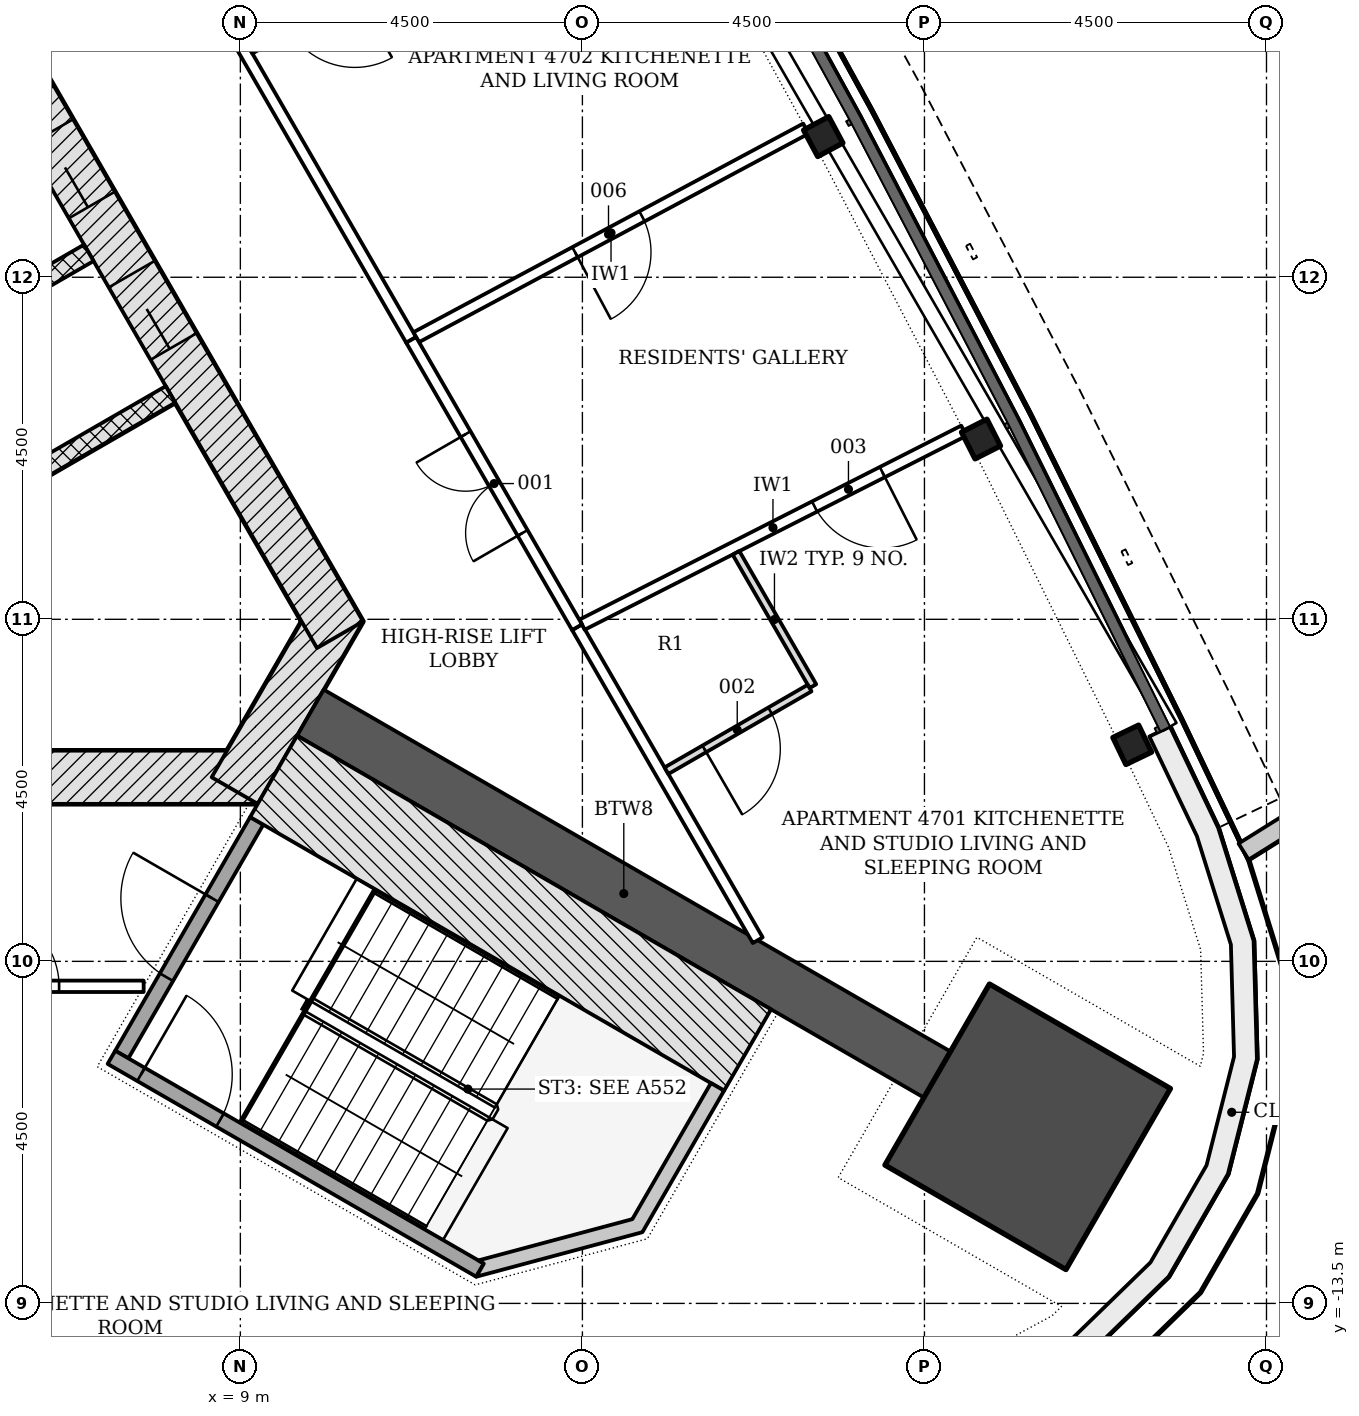
"""IFC4 building model, lengths in metres.
Left out: names, types, materials, properties, quantities, classifications, styles, units other than length and angle.
Written with IfcOpenShell. Run it as: python <this file> out.ifc"""

import sys

from ifc_helpers import new_model, si_unit, direction, frame, frame_2d, origin, origin_2d, place, context, subcontext, project, spatial, polyline, rectangle, i_section, outline, extrude, element, fill, save


model = new_model("IFC4")
c1 = context("Model", 3, precision=1e-05, world=origin(), true_north=direction((0.0, 1.0)))
c2 = subcontext(c1, "Body", "Model", "MODEL_VIEW")
j1 = project(units=[si_unit("LENGTHUNIT", "METRE"), si_unit("PLANEANGLEUNIT", "RADIAN")], contexts=[c1])
p1 = place(None, origin())
s1 = spatial("IfcSite", under=j1, at=p1, CompositionType="ELEMENT")
p2 = place(p1, origin())
s2 = spatial("IfcBuilding", under=s1, at=p2, CompositionType="ELEMENT")
p3 = place(p2, frame((0.0, 0.0, 185.1)))
s3 = spatial("IfcBuildingStorey", under=s2, at=p3, CompositionType="ELEMENT", Elevation=185.1)
p4 = place(p3, frame((-9.229, -6.578, -0.2), z_axis=(0.0, 0.0, 1.0), x_axis=(1.0, 0.0, 0.0)))
e1 = element("IfcWall", 1, at=p4, inside=s3, PredefinedType="SHEAR", context=c2, shape_type="SweptSolid", body=[
    extrude(rectangle(XDim=18.458, YDim=0.7, at=frame_2d((9.229, 0.0))), origin(), (0.0, 0.0, 1.0), 3.6),
])
p5 = place(p4, frame((9.5, 0.0, 0.2)))
e2 = element("IfcOpeningElement", 2, at=p5, cuts=e1, PredefinedType="OPENING", context=c2, shape_type="SweptSolid", body=[
    extrude(rectangle(XDim=1.0, YDim=2.1, at=frame_2d((0.5, 1.05))), frame((0.0, 0.36, 0.0), z_axis=(0.0, -1.0, 0.0), x_axis=(1.0, 0.0, 0.0)), (0.0, 0.0, 1.0), 0.72),
])
p6 = place(p4, frame((4.402, 0.0, 0.2)))
e3 = element("IfcOpeningElement", 3, at=p6, cuts=e1, PredefinedType="OPENING", context=c2, shape_type="SweptSolid", body=[
    extrude(rectangle(XDim=0.9, YDim=2.1, at=frame_2d((0.45, 1.05))), frame((0.0, 0.36, 0.0), z_axis=(0.0, -1.0, 0.0), x_axis=(1.0, 0.0, 0.0)), (0.0, 0.0, 1.0), 0.72),
])
p7 = place(p4, frame((13.927, 0.0, 0.2)))
e4 = element("IfcOpeningElement", 4, at=p7, cuts=e1, PredefinedType="OPENING", context=c2, shape_type="SweptSolid", body=[
    extrude(rectangle(XDim=0.9, YDim=2.1, at=frame_2d((0.45, 1.05))), frame((0.0, 0.36, 0.0), z_axis=(0.0, -1.0, 0.0), x_axis=(1.0, 0.0, 0.0)), (0.0, 0.0, 1.0), 0.72),
])
p8 = place(p3, frame((8.926, -6.753, -0.2), z_axis=(0.0, 0.0, 1.0), x_axis=(0.500042739161, 0.866000726912, 0.0)))
e5 = element("IfcWall", 5, at=p8, inside=s3, PredefinedType="SHEAR", context=c2, shape_type="SweptSolid", body=[
    extrude(rectangle(XDim=2.771, YDim=0.7, at=frame_2d((1.386, 0.0))), origin(), (0.0, 0.0, 1.0), 3.6),
])
p9 = place(p3, frame((10.311, -4.703, -0.2), z_axis=(0.0, 0.0, 1.0), x_axis=(-0.500001446645, 0.866024568562, 0.0)))
e6 = element("IfcWall", 6, at=p9, inside=s3, PredefinedType="SHEAR", context=c2, shape_type="SweptSolid", body=[
    extrude(rectangle(XDim=18.458, YDim=0.7, at=frame_2d((9.229, 0.0))), origin(), (0.0, 0.0, 1.0), 3.6),
])
p10 = place(p9, frame((4.379, 0.0, 0.2)))
e7 = element("IfcOpeningElement", 7, at=p10, cuts=e6, PredefinedType="OPENING", context=c2, shape_type="SweptSolid", body=[
    extrude(rectangle(XDim=1.1, YDim=2.1, at=frame_2d((0.55, 1.05))), frame((0.0, 0.36, 0.0), z_axis=(0.0, -1.0, 0.0), x_axis=(1.0, 0.0, 0.0)), (0.0, 0.0, 1.0), 0.72),
])
p11 = place(p9, frame((6.529, 0.0, 0.2)))
e8 = element("IfcOpeningElement", 8, at=p11, cuts=e6, PredefinedType="OPENING", context=c2, shape_type="SweptSolid", body=[
    extrude(rectangle(XDim=1.1, YDim=2.1, at=frame_2d((0.55, 1.05))), frame((0.0, 0.36, 0.0), z_axis=(0.0, -1.0, 0.0), x_axis=(1.0, 0.0, 0.0)), (0.0, 0.0, 1.0), 0.72),
])
p12 = place(p9, frame((8.679, 0.0, 0.2)))
e9 = element("IfcOpeningElement", 9, at=p12, cuts=e6, PredefinedType="OPENING", context=c2, shape_type="SweptSolid", body=[
    extrude(rectangle(XDim=1.1, YDim=2.1, at=frame_2d((0.55, 1.05))), frame((0.0, 0.36, 0.0), z_axis=(0.0, -1.0, 0.0), x_axis=(1.0, 0.0, 0.0)), (0.0, 0.0, 1.0), 0.72),
])
p13 = place(p9, frame((10.829, 0.0, 0.2)))
e10 = element("IfcOpeningElement", 10, at=p13, cuts=e6, PredefinedType="OPENING", context=c2, shape_type="SweptSolid", body=[
    extrude(rectangle(XDim=1.1, YDim=2.1, at=frame_2d((0.55, 1.05))), frame((0.0, 0.36, 0.0), z_axis=(0.0, -1.0, 0.0), x_axis=(1.0, 0.0, 0.0)), (0.0, 0.0, 1.0), 0.72),
])
p14 = place(p9, frame((12.979, 0.0, 0.2)))
e11 = element("IfcOpeningElement", 11, at=p14, cuts=e6, PredefinedType="OPENING", context=c2, shape_type="SweptSolid", body=[
    extrude(rectangle(XDim=1.1, YDim=2.1, at=frame_2d((0.55, 1.05))), frame((0.0, 0.36, 0.0), z_axis=(0.0, -1.0, 0.0), x_axis=(1.0, 0.0, 0.0)), (0.0, 0.0, 1.0), 0.72),
])
p15 = place(p3, frame((9.922, -5.728, -0.2), z_axis=(0.0, 0.0, 1.0), x_axis=(0.866025463095, -0.499999897272, 0.0)))
e12 = element("IfcWall", 12, at=p15, inside=s3, PredefinedType="SHEAR", context=c2, shape_type="SweptSolid", body=[
    extrude(rectangle(XDim=9.521, YDim=0.7, at=frame_2d((4.761, 0.0))), origin(), (0.0, 0.0, 1.0), 3.6),
])
p16 = place(p3, frame((19.358, -11.177, -0.2), z_axis=(0.0, 0.0, 1.0), x_axis=(0.866025403784, -0.5, 0.0)))
e13 = element("IfcColumn", 13, at=p16, inside=s3, PredefinedType="COLUMN", context=c2, shape_type="SweptSolid", body=[
    extrude(rectangle(XDim=2.75, YDim=2.75, at=origin_2d()), origin(), (0.0, 0.0, 1.0), 3.6),
])
for number, where, z_axis, x_axis in (
    (14, (20.734, -6.151, -0.2), (0.0, 0.0, 1.0), (-0.434, 0.901, 0.0)),
    (15, (18.744, -2.128, -0.2), (0.0, 0.0, 1.0), (-0.453, 0.892, 0.0)),
    (16, (16.668, 1.851, -0.2), (0.0, 0.0, 1.0), (-0.472, 0.882, 0.0)),
):
    element("IfcColumn", number, at=place(p3, frame(where, z_axis=z_axis, x_axis=x_axis)), inside=s3, PredefinedType="COLUMN", context=c2, shape_type="SweptSolid", body=[
        extrude(i_section(OverallWidth=0.394, OverallDepth=0.376, WebThickness=0.017, FlangeThickness=0.028, FilletRadius=0.015, at=origin_2d()), origin(), (0.0, 0.0, 1.0), 3.6),
    ])
p17 = place(p3, origin())
e17 = element("IfcWall", 17, at=p17, inside=s3, PredefinedType="NOTDEFINED", context=c2, shape_type="SweptSolid", body=[
    extrude(outline(polyline([(15.735, -15.429), (17.205, -15.313), (18.726, -14.974), (20.096, -14.233), (21.213, -13.147), (21.992, -11.798), (22.374, -10.287), (22.33, -8.73), (21.865, -7.243), (21.229, -5.913), (20.959, -6.042), (21.584, -7.353), (22.032, -8.78), (22.073, -10.254), (21.711, -11.684), (20.974, -12.961), (19.917, -13.989), (18.619, -14.69), (17.16, -15.016), (15.712, -15.13), (15.735, -15.429)])), origin(), (0.0, 0.0, 1.0), 3.3),
])
p18 = place(p3, origin())
e18 = element("IfcWall", 18, at=p18, inside=s3, PredefinedType="PARAPET", context=c2, shape_type="SweptSolid", body=[
    extrude(outline(polyline([(22.265, -7.662), (24.846, -6.048), (27.171, -4.156), (29.169, -2.042), (30.78, 0.228), (31.954, 2.586), (32.656, 4.96), (32.864, 7.277), (32.572, 9.469), (31.789, 11.467), (30.539, 13.211), (28.86, 14.648), (26.802, 15.735), (24.429, 16.438), (21.812, 16.737), (19.031, 16.622), (16.171, 16.096), (13.317, 15.176), (10.558, 13.889), (10.664, 13.662), (13.409, 14.942), (16.232, 15.853), (19.059, 16.373), (21.803, 16.487), (24.379, 16.193), (26.708, 15.502), (28.719, 14.44), (30.354, 13.041), (31.568, 11.346), (32.328, 9.406), (32.612, 7.272), (32.409, 5.007), (31.72, 2.678), (30.565, 0.357), (28.976, -1.883), (27.001, -3.972), (24.7, -5.844), (22.132, -7.45), (22.265, -7.662)])), origin(), (0.0, 0.0, 1.0), 1.1),
])
for number, where, z_axis, x_axis in (
    (19, (8.081, -1.541, -0.2), (0.0, 0.0, 1.0), (-0.866, -0.5, 0.0)),
    (20, (7.006, 0.321, -0.2), (0.0, 0.0, 1.0), (-0.866, -0.5, 0.0)),
):
    element("IfcWall", number, at=place(p3, frame(where, z_axis=z_axis, x_axis=x_axis)), inside=s3, PredefinedType="PARTITIONING", context=c2, shape_type="SweptSolid", body=[
        extrude(rectangle(XDim=2.5, YDim=0.25, at=frame_2d((1.25, 0.0))), origin(), (0.0, 0.0, 1.0), 3.6),
    ])
p19 = place(p3, frame((7.44, -10.226, -0.2), z_axis=(0.0, 0.0, 1.0), x_axis=(0.500022077904, 0.866012656725, 0.0)))
e21 = element("IfcWall", 21, at=p19, inside=s3, PredefinedType="SHEAR", context=c2, shape_type="SweptSolid", body=[
    extrude(rectangle(XDim=3.55, YDim=0.2, at=frame_2d((1.775, 0.0))), origin(), (0.0, 0.0, 1.0), 3.6),
])
p20 = place(p19, frame((1.175, 0.0, 0.2)))
e22 = element("IfcOpeningElement", 22, at=p20, cuts=e21, PredefinedType="OPENING", context=c2, shape_type="SweptSolid", body=[
    extrude(rectangle(XDim=1.2, YDim=2.1, at=frame_2d((0.6, 1.05))), frame((0.0, 0.11, 0.0), z_axis=(0.0, -1.0, 0.0), x_axis=(1.0, 0.0, 0.0)), (0.0, 0.0, 1.0), 0.22),
])
p21 = place(p3, frame((7.304, -10.262, -0.2), z_axis=(0.0, 0.0, 1.0), x_axis=(0.866026594901, -0.49999793692, 0.0)))
e23 = element("IfcWall", 23, at=p21, inside=s3, PredefinedType="SHEAR", context=c2, shape_type="SweptSolid", body=[
    extrude(rectangle(XDim=5.6, YDim=0.2, at=frame_2d((2.8, 0.0))), origin(), (0.0, 0.0, 1.0), 3.6),
])
p22 = place(p21, frame((0.45, 0.0, 0.2)))
e24 = element("IfcOpeningElement", 24, at=p22, cuts=e23, PredefinedType="OPENING", context=c2, shape_type="SweptSolid", body=[
    extrude(rectangle(XDim=1.2, YDim=2.1, at=frame_2d((0.6, 1.05))), frame((0.0, 0.11, 0.0), z_axis=(0.0, -1.0, 0.0), x_axis=(1.0, 0.0, 0.0)), (0.0, 0.0, 1.0), 0.22),
])
p23 = place(p3, frame((9.438, -6.566, -0.2), z_axis=(0.0, 0.0, 1.0), x_axis=(0.866026919366, -0.499997374926, 0.0)))
e25 = element("IfcWall", 25, at=p23, inside=s3, PredefinedType="SHEAR", context=c2, shape_type="SweptSolid", body=[
    extrude(rectangle(XDim=7.2, YDim=1.236, at=frame_2d((3.6, 0.0))), origin(), (0.0, 0.0, 1.0), 3.6),
])
p24 = place(p3, frame((0.0, 0.0, -0.2)))
e26 = element("IfcWall", 26, at=p24, inside=s3, PredefinedType="SHEAR", context=c2, shape_type="SweptSolid", body=[
    extrude(outline(polyline([(12.104, -13.149), (14.289, -12.563), (15.364, -10.701), (15.191, -10.601), (14.157, -12.392), (12.132, -12.934), (12.204, -12.976), (12.204, -12.976), (12.204, -12.976), (12.204, -12.976), (12.204, -12.976), (12.204, -12.976), (12.204, -12.976), (12.204, -12.976), (12.204, -12.976), (12.204, -12.976), (12.204, -12.976), (12.204, -12.976), (12.204, -12.976), (12.204, -12.976), (12.204, -12.976), (12.204, -12.976), (12.204, -12.976), (12.104, -13.149)])), origin(), (0.0, 0.0, 1.0), 3.6),
])
p25 = place(p3, frame((15.807, -8.722, 0.0), z_axis=(0.0, 0.0, 1.0), x_axis=(-0.500015802937, 0.866016279763, 0.0)))
e27 = element("IfcWall", 27, at=p25, inside=s3, PredefinedType="PARTITIONING", context=c2, shape_type="SweptSolid", body=[
    extrude(rectangle(XDim=4.755, YDim=0.15, at=frame_2d((2.377, 0.0))), origin(), (0.0, 0.0, 1.0), 2.847),
])
p26 = place(p3, frame((11.247, -0.824, 0.0), z_axis=(0.0, 0.0, 1.0), x_axis=(-0.499997921847, 0.866026603603, 0.0)))
e28 = element("IfcWall", 28, at=p26, inside=s3, PredefinedType="PARTITIONING", context=c2, shape_type="SweptSolid", body=[
    extrude(rectangle(XDim=14.065, YDim=0.15, at=frame_2d((7.032, 0.0))), origin(), (0.0, 0.0, 1.0), 2.847),
])
p27 = place(p26, frame((11.953, 0.0, 0.0)))
e29 = element("IfcOpeningElement", 29, at=p27, cuts=e28, PredefinedType="OPENING", context=c2, shape_type="SweptSolid", body=[
    extrude(rectangle(XDim=1.0, YDim=2.1, at=frame_2d((0.5, 1.05))), frame((0.0, 0.085, 0.0), z_axis=(0.0, -1.0, 0.0), x_axis=(1.0, 0.0, 0.0)), (0.0, 0.0, 1.0), 0.17),
])
p28 = place(p3, frame((18.518, -2.019, 0.0), z_axis=(0.0, 0.0, 1.0), x_axis=(-0.891548029597, -0.452926164978, 0.0)))
e30 = element("IfcWall", 30, at=p28, inside=s3, PredefinedType="PARTITIONING", context=c2, shape_type="SweptSolid", body=[
    extrude(rectangle(XDim=5.632, YDim=0.15, at=frame_2d((2.816, 0.0))), origin(), (0.0, 0.0, 1.0), 3.4),
])
p29 = place(p28, frame((1.202, 0.0, 0.0)))
e31 = element("IfcOpeningElement", 31, at=p29, cuts=e30, PredefinedType="OPENING", context=c2, shape_type="SweptSolid", body=[
    extrude(rectangle(XDim=1.0, YDim=2.1, at=frame_2d((0.5, 1.05))), frame((0.0, 0.085, 0.0), z_axis=(0.0, -1.0, 0.0), x_axis=(1.0, 0.0, 0.0)), (0.0, 0.0, 1.0), 0.17),
])
p30 = place(p3, frame((16.44, 1.956, 0.0), z_axis=(0.0, 0.0, 1.0), x_axis=(-0.881627849584, -0.471945266783, 0.0)))
e32 = element("IfcWall", 32, at=p30, inside=s3, PredefinedType="PARTITIONING", context=c2, shape_type="SweptSolid", body=[
    extrude(rectangle(XDim=5.815, YDim=0.15, at=frame_2d((2.907, 0.0))), origin(), (0.0, 0.0, 1.0), 3.4),
])
p31 = place(p30, frame((2.445, 0.0, 0.0)))
e33 = element("IfcOpeningElement", 33, at=p31, cuts=e32, PredefinedType="OPENING", context=c2, shape_type="SweptSolid", body=[
    extrude(rectangle(XDim=1.0, YDim=2.1, at=frame_2d((0.5, 1.05))), frame((0.0, 0.085, 0.0), z_axis=(0.0, -1.0, 0.0), x_axis=(1.0, 0.0, 0.0)), (0.0, 0.0, 1.0), 0.17),
])
p32 = place(p3, frame((13.429, -4.604, 0.0), z_axis=(0.0, 0.0, 1.0), x_axis=(-0.499995208485, 0.866028170149, 0.0)))
e34 = element("IfcWall", 34, at=p32, inside=s3, PredefinedType="PARTITIONING", context=c2, shape_type="SweptSolid", body=[
    extrude(rectangle(XDim=4.365, YDim=0.15, at=frame_2d((2.182, 0.0))), origin(), (0.0, 0.0, 1.0), 2.852),
])
p33 = place(p32, frame((1.432, 0.0, 0.0)))
e35 = element("IfcOpeningElement", 35, at=p33, cuts=e34, PredefinedType="OPENING", context=c2, shape_type="SweptSolid", body=[
    extrude(rectangle(XDim=1.5, YDim=2.1, at=frame_2d((0.75, 1.05))), frame((0.0, 0.085, 0.0), z_axis=(0.0, -1.0, 0.0), x_axis=(1.0, 0.0, 0.0)), (0.0, 0.0, 1.0), 0.17),
])
p34 = place(p3, frame((15.521, -3.626, 0.0), z_axis=(0.0, 0.0, 1.0), x_axis=(0.500042536776, -0.866000843773, 0.0)))
e36 = element("IfcWall", 36, at=p34, inside=s3, PredefinedType="PARTITIONING", context=c2, shape_type="SweptSolid", body=[
    extrude(rectangle(XDim=2.025, YDim=0.1, at=frame_2d((1.012, 0.0))), origin(), (0.0, 0.0, 1.0), 2.847),
])
p35 = place(p3, frame((16.49, -5.405, 0.0), z_axis=(0.0, 0.0, 1.0), x_axis=(-0.866065968399, -0.499929733443, 0.0)))
e37 = element("IfcWall", 37, at=p35, inside=s3, PredefinedType="PARTITIONING", context=c2, shape_type="SweptSolid", body=[
    extrude(rectangle(XDim=2.175, YDim=0.1, at=frame_2d((1.087, 0.0))), origin(), (0.0, 0.0, 1.0), 3.4),
])
p36 = place(p35, frame((0.6, 0.0, 0.0)))
e38 = element("IfcOpeningElement", 38, at=p36, cuts=e37, PredefinedType="OPENING", context=c2, shape_type="SweptSolid", body=[
    extrude(rectangle(XDim=1.0, YDim=2.1, at=frame_2d((0.5, 1.05))), frame((0.0, 0.06, 0.0), z_axis=(0.0, -1.0, 0.0), x_axis=(1.0, 0.0, 0.0)), (0.0, 0.0, 1.0), 0.12),
])
p37 = place(p3, frame((14.277, 5.885, 0.0), z_axis=(0.0, 0.0, 1.0), x_axis=(-0.871335785584, -0.490687220907, 0.0)))
e39 = element("IfcWall", 39, at=p37, inside=s3, PredefinedType="PARTITIONING", context=c2, shape_type="SweptSolid", body=[
    extrude(rectangle(XDim=5.904, YDim=0.1, at=frame_2d((2.952, 0.0))), origin(), (0.0, 0.0, 1.0), 3.4),
])
p38 = place(p37, frame((1.339, 0.0, 0.0)))
e40 = element("IfcOpeningElement", 40, at=p38, cuts=e39, PredefinedType="OPENING", context=c2, shape_type="SweptSolid", body=[
    extrude(rectangle(XDim=1.0, YDim=2.1, at=frame_2d((0.5, 1.05))), frame((0.0, 0.06, 0.0), z_axis=(0.0, -1.0, 0.0), x_axis=(1.0, 0.0, 0.0)), (0.0, 0.0, 1.0), 0.12),
])
p39 = place(p37, frame((4.329, 0.0, 0.0)))
e41 = element("IfcOpeningElement", 41, at=p39, cuts=e39, PredefinedType="OPENING", context=c2, shape_type="SweptSolid", body=[
    extrude(rectangle(XDim=1.0, YDim=2.1, at=frame_2d((0.5, 1.05))), frame((0.0, 0.06, 0.0), z_axis=(0.0, -1.0, 0.0), x_axis=(1.0, 0.0, 0.0)), (0.0, 0.0, 1.0), 0.12),
])
p40 = place(p3, frame((-1.979, -9.328, 0.0), z_axis=(0.0, 0.0, 1.0), x_axis=(1.0, 0.0, 0.0)))
e42 = element("IfcWall", 42, at=p40, inside=s3, PredefinedType="PARTITIONING", context=c2, shape_type="SweptSolid", body=[
    extrude(rectangle(XDim=9.706, YDim=0.15, at=frame_2d((4.853, 0.0))), origin(), (0.0, 0.0, 1.0), 2.847),
])
p41 = place(p40, frame((1.703, 0.0, 0.0)))
e43 = element("IfcOpeningElement", 43, at=p41, cuts=e42, PredefinedType="OPENING", context=c2, shape_type="SweptSolid", body=[
    extrude(rectangle(XDim=1.0, YDim=2.1, at=frame_2d((0.5, 1.05))), frame((0.0, 0.085, 0.0), z_axis=(0.0, -1.0, 0.0), x_axis=(1.0, 0.0, 0.0)), (0.0, 0.0, 1.0), 0.17),
])
p42 = place(p40, frame((7.594, 0.0, 0.0)))
e44 = element("IfcOpeningElement", 44, at=p42, cuts=e42, PredefinedType="OPENING", context=c2, shape_type="SweptSolid", body=[
    extrude(rectangle(XDim=1.0, YDim=2.1, at=frame_2d((0.5, 1.05))), frame((0.0, 0.085, 0.0), z_axis=(0.0, -1.0, 0.0), x_axis=(1.0, 0.0, 0.0)), (0.0, 0.0, 1.0), 0.17),
])
p43 = place(p10, origin())
e45 = element("IfcDoor", 45, at=p43, inside=s3, OperationType="DOUBLE_DOOR_SLIDING", PredefinedType="DOOR", context=c2, shape_type="SweptSolid", body=[
    extrude(rectangle(XDim=1.1, YDim=2.1, at=frame_2d((0.55, 1.05))), frame((0.0, 0.025, 0.0), z_axis=(0.0, -1.0, 0.0), x_axis=(1.0, 0.0, 0.0)), (0.0, 0.0, 1.0), 0.05),
])
fill(e7, e45)
p44 = place(p11, origin())
e46 = element("IfcDoor", 46, at=p44, inside=s3, OperationType="DOUBLE_DOOR_SLIDING", PredefinedType="DOOR", context=c2, shape_type="SweptSolid", body=[
    extrude(rectangle(XDim=1.1, YDim=2.1, at=frame_2d((0.55, 1.05))), frame((0.0, 0.025, 0.0), z_axis=(0.0, -1.0, 0.0), x_axis=(1.0, 0.0, 0.0)), (0.0, 0.0, 1.0), 0.05),
])
fill(e8, e46)
p45 = place(p20, origin())
e47 = element("IfcDoor", 47, at=p45, inside=s3, OperationType="SINGLE_SWING_RIGHT", PredefinedType="DOOR", context=c2, shape_type="SweptSolid", body=[
    extrude(rectangle(XDim=1.2, YDim=2.1, at=frame_2d((0.6, 1.05))), frame((0.0, 0.025, 0.0), z_axis=(0.0, -1.0, 0.0), x_axis=(1.0, 0.0, 0.0)), (0.0, 0.0, 1.0), 0.05),
])
fill(e22, e47)
p46 = place(p22, origin())
e48 = element("IfcDoor", 48, at=p46, inside=s3, OperationType="SINGLE_SWING_LEFT", PredefinedType="DOOR", context=c2, shape_type="SweptSolid", body=[
    extrude(rectangle(XDim=1.2, YDim=2.1, at=frame_2d((0.6, 1.05))), frame((0.0, 0.025, 0.0), z_axis=(0.0, -1.0, 0.0), x_axis=(1.0, 0.0, 0.0)), (0.0, 0.0, 1.0), 0.05),
])
fill(e24, e48)
p47 = place(p33, origin())
e49 = element("IfcDoor", 49, at=p47, inside=s3, OperationType="DOUBLE_DOOR_SINGLE_SWING", PredefinedType="DOOR", context=c2, shape_type="SweptSolid", body=[
    extrude(rectangle(XDim=1.5, YDim=2.1, at=frame_2d((0.75, 1.05))), frame((0.0, 0.025, 0.0), z_axis=(0.0, -1.0, 0.0), x_axis=(1.0, 0.0, 0.0)), (0.0, 0.0, 1.0), 0.05),
])
fill(e35, e49)
p48 = place(p36, origin())
e50 = element("IfcDoor", 50, at=p48, inside=s3, OperationType="SINGLE_SWING_RIGHT", PredefinedType="DOOR", context=c2, shape_type="SweptSolid", body=[
    extrude(rectangle(XDim=1.0, YDim=2.1, at=frame_2d((0.5, 1.05))), frame((0.0, 0.025, 0.0), z_axis=(0.0, -1.0, 0.0), x_axis=(1.0, 0.0, 0.0)), (0.0, 0.0, 1.0), 0.05),
])
fill(e38, e50)
p49 = place(p29, origin())
e51 = element("IfcDoor", 51, at=p49, inside=s3, OperationType="SINGLE_SWING_LEFT", PredefinedType="DOOR", context=c2, shape_type="SweptSolid", body=[
    extrude(rectangle(XDim=1.0, YDim=2.1, at=frame_2d((0.5, 1.05))), frame((0.0, 0.025, 0.0), z_axis=(0.0, -1.0, 0.0), x_axis=(1.0, 0.0, 0.0)), (0.0, 0.0, 1.0), 0.05),
])
fill(e31, e51)
p50 = place(p31, origin())
e52 = element("IfcDoor", 52, at=p50, inside=s3, OperationType="SINGLE_SWING_RIGHT", PredefinedType="DOOR", context=c2, shape_type="SweptSolid", body=[
    extrude(rectangle(XDim=1.0, YDim=2.1, at=frame_2d((0.5, 1.05))), frame((0.0, 0.025, 0.0), z_axis=(0.0, -1.0, 0.0), x_axis=(1.0, 0.0, 0.0)), (0.0, 0.0, 1.0), 0.05),
])
fill(e33, e52)
p51 = place(p42, origin())
e53 = element("IfcDoor", 53, at=p51, inside=s3, OperationType="SINGLE_SWING_LEFT", PredefinedType="DOOR", context=c2, shape_type="SweptSolid", body=[
    extrude(rectangle(XDim=1.0, YDim=2.1, at=frame_2d((0.5, 1.05))), frame((0.0, 0.025, 0.0), z_axis=(0.0, -1.0, 0.0), x_axis=(1.0, 0.0, 0.0)), (0.0, 0.0, 1.0), 0.05),
])
fill(e44, e53)
save(model, sys.argv[1])
